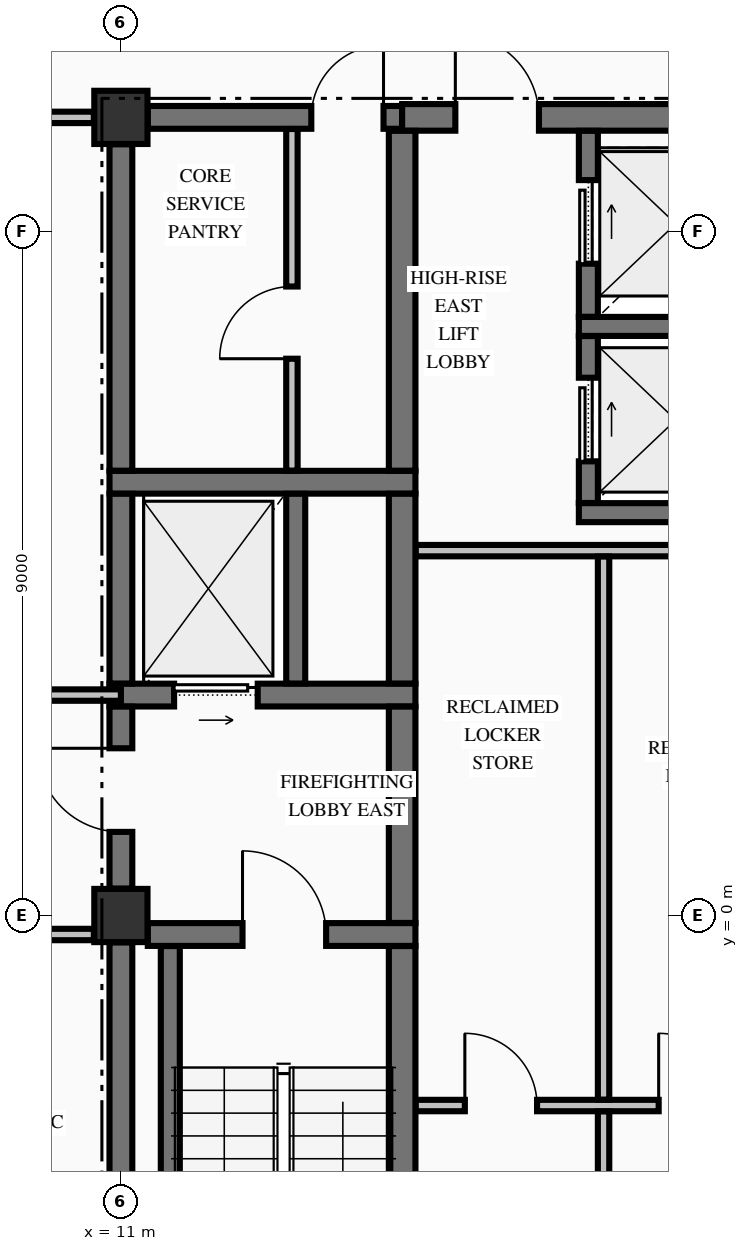
"""IFC4 building model, lengths in metres.
Left out: names, types, materials, properties, quantities, classifications, styles, units other than length and angle.
Written with IfcOpenShell. Run it as: python <this file> out.ifc"""

import sys

from ifc_helpers import new_model, si_unit, direction, frame, frame_2d, origin, origin_2d, place, context, subcontext, project, spatial, rectangle, extrude, element, fill, save


model = new_model("IFC4")
c1 = context("Model", 3, precision=1e-05, world=origin(), true_north=direction((0.0, 1.0)))
c2 = subcontext(c1, "Body", "Model", "MODEL_VIEW")
j1 = project(units=[si_unit("LENGTHUNIT", "METRE"), si_unit("PLANEANGLEUNIT", "RADIAN")], contexts=[c1])
p1 = place(None, origin())
s1 = spatial("IfcSite", under=j1, at=p1, CompositionType="ELEMENT")
p2 = place(p1, origin())
s2 = spatial("IfcBuilding", under=s1, at=p2, CompositionType="ELEMENT")
p3 = place(p2, frame((0.0, 0.0, 270.58)))
s3 = spatial("IfcBuildingStorey", under=s2, at=p3, CompositionType="ELEMENT", Elevation=270.58)
for number, where, z_axis, x_axis in (
    (1, (11.0, 0.0, -0.325), (0.0, 0.0, 1.0), (1.0, 0.0, 0.0)),
    (2, (11.0, 10.5, -0.325), (0.0, 0.0, 1.0), (1.0, 0.0, 0.0)),
):
    element("IfcColumn", number, at=place(p3, frame(where, z_axis=z_axis, x_axis=x_axis)), inside=s3, PredefinedType="COLUMN", context=c2, shape_type="SweptSolid", body=[
        extrude(rectangle(XDim=0.7, YDim=0.7, at=origin_2d()), origin(), (0.0, 0.0, 1.0), 3.815),
    ])
p4 = place(p3, frame((11.354, -0.25, 0.0), z_axis=(0.0, 0.0, 1.0), x_axis=(1.0, 0.0, 0.0)))
e3 = element("IfcWall", 3, at=p4, inside=s3, PredefinedType="SHEAR", context=c2, shape_type="SweptSolid", body=[
    extrude(rectangle(XDim=3.521, YDim=0.3, at=frame_2d((1.76, 0.0))), origin(), (0.0, 0.0, 1.0), 3.49),
])
p5 = place(p4, frame((1.246, 0.0, 0.0)))
e4 = element("IfcOpeningElement", 4, at=p5, cuts=e3, PredefinedType="OPENING", context=c2, shape_type="SweptSolid", body=[
    extrude(rectangle(XDim=1.1, YDim=2.15, at=frame_2d((0.55, 1.075))), frame((0.0, 0.16, 0.0), z_axis=(0.0, -1.0, 0.0), x_axis=(1.0, 0.0, 0.0)), (0.0, 0.0, 1.0), 0.32),
])
p6 = place(p3, frame((10.85, 2.9, 0.0), z_axis=(0.0, 0.0, 1.0), x_axis=(1.0, 0.0, 0.0)))
e5 = element("IfcWall", 5, at=p6, inside=s3, PredefinedType="SHEAR", context=c2, shape_type="SweptSolid", body=[
    extrude(rectangle(XDim=4.025, YDim=0.3, at=frame_2d((2.012, 0.0))), origin(), (0.0, 0.0, 1.0), 3.49),
])
p7 = place(p6, frame((0.85, 0.0, 0.0)))
e6 = element("IfcOpeningElement", 6, at=p7, cuts=e5, PredefinedType="OPENING", context=c2, shape_type="SweptSolid", body=[
    extrude(rectangle(XDim=1.1, YDim=2.2, at=frame_2d((0.55, 1.1))), frame((0.0, 0.16, 0.0), z_axis=(0.0, -1.0, 0.0), x_axis=(1.0, 0.0, 0.0)), (0.0, 0.0, 1.0), 0.32),
])
p8 = place(p3, frame((17.025, 5.3, 0.0), z_axis=(0.0, 0.0, 1.0), x_axis=(1.0, 0.0, 0.0)))
e7 = element("IfcWall", 7, at=p8, inside=s3, PredefinedType="SOLIDWALL", context=c2, shape_type="SweptSolid", body=[
    extrude(rectangle(XDim=3.15, YDim=0.25, at=frame_2d((1.575, 0.0))), origin(), (0.0, 0.0, 1.0), 3.49),
])
p9 = place(p3, frame((10.85, 5.7, 0.0), z_axis=(0.0, 0.0, 1.0), x_axis=(1.0, 0.0, 0.0)))
e8 = element("IfcWall", 8, at=p9, inside=s3, PredefinedType="SHEAR", context=c2, shape_type="SweptSolid", body=[
    extrude(rectangle(XDim=4.025, YDim=0.3, at=frame_2d((2.012, 0.0))), origin(), (0.0, 0.0, 1.0), 3.49),
])
p10 = place(p3, frame((17.025, 7.75, 0.0), z_axis=(0.0, 0.0, 1.0), x_axis=(1.0, 0.0, 0.0)))
e9 = element("IfcWall", 9, at=p10, inside=s3, PredefinedType="SOLIDWALL", context=c2, shape_type="SweptSolid", body=[
    extrude(rectangle(XDim=3.15, YDim=0.25, at=frame_2d((1.575, 0.0))), origin(), (0.0, 0.0, 1.0), 3.49),
])
p11 = place(p3, frame((11.354, 10.5, 0.0), z_axis=(0.0, 0.0, 1.0), x_axis=(1.0, 0.0, 0.0)))
e10 = element("IfcWall", 10, at=p11, inside=s3, PredefinedType="SHEAR", context=c2, shape_type="SweptSolid", body=[
    extrude(rectangle(XDim=3.346, YDim=0.3, at=frame_2d((1.673, 0.0))), origin(), (0.0, 0.0, 1.0), 3.49),
])
p12 = place(p11, frame((2.151, 0.0, 0.0)))
e11 = element("IfcOpeningElement", 11, at=p12, cuts=e10, PredefinedType="OPENING", context=c2, shape_type="SweptSolid", body=[
    extrude(rectangle(XDim=0.95, YDim=2.15, at=frame_2d((0.475, 1.075))), frame((0.0, 0.16, 0.0), z_axis=(0.0, -1.0, 0.0), x_axis=(1.0, 0.0, 0.0)), (0.0, 0.0, 1.0), 0.32),
])
p13 = place(p3, frame((14.7, 10.5, 0.0), z_axis=(0.0, 0.0, 1.0), x_axis=(1.0, 0.0, 0.0)))
e12 = element("IfcWall", 12, at=p13, inside=s3, PredefinedType="SHEAR", context=c2, shape_type="SweptSolid", body=[
    extrude(rectangle(XDim=4.946, YDim=0.35, at=frame_2d((2.473, 0.0))), origin(), (0.0, 0.0, 1.0), 3.49),
])
p14 = place(p13, frame((0.7, 0.0, 0.0)))
e13 = element("IfcOpeningElement", 13, at=p14, cuts=e12, PredefinedType="OPENING", context=c2, shape_type="SweptSolid", body=[
    extrude(rectangle(XDim=1.1, YDim=2.15, at=frame_2d((0.55, 1.075))), frame((0.0, 0.185, 0.0), z_axis=(0.0, -1.0, 0.0), x_axis=(1.0, 0.0, 0.0)), (0.0, 0.0, 1.0), 0.37),
])
p15 = place(p3, frame((14.878, -2.5, 0.0), z_axis=(0.0, 0.0, 1.0), x_axis=(1.0, 0.0, 0.0)))
e14 = element("IfcWall", 14, at=p15, inside=s3, PredefinedType="PARTITIONING", context=c2, shape_type="SweptSolid", body=[
    extrude(rectangle(XDim=4.944, YDim=0.15, at=frame_2d((2.472, 0.0))), origin(), (0.0, 0.0, 1.0), 3.49),
])
p16 = place(p15, frame((0.647, 0.0, 0.0)))
e15 = element("IfcOpeningElement", 15, at=p16, cuts=e14, PredefinedType="OPENING", context=c2, shape_type="SweptSolid", body=[
    extrude(rectangle(XDim=0.95, YDim=2.15, at=frame_2d((0.475, 1.075))), frame((0.0, 0.085, 0.0), z_axis=(0.0, -1.0, 0.0), x_axis=(1.0, 0.0, 0.0)), (0.0, 0.0, 1.0), 0.17),
])
p17 = place(p15, frame((3.197, 0.0, 0.0)))
e16 = element("IfcOpeningElement", 16, at=p17, cuts=e14, PredefinedType="OPENING", context=c2, shape_type="SweptSolid", body=[
    extrude(rectangle(XDim=0.95, YDim=2.15, at=frame_2d((0.475, 1.075))), frame((0.0, 0.085, 0.0), z_axis=(0.0, -1.0, 0.0), x_axis=(1.0, 0.0, 0.0)), (0.0, 0.0, 1.0), 0.17),
])
p18 = place(p3, frame((-10.644, -0.25, 0.0), z_axis=(0.0, 0.0, 1.0), x_axis=(1.0, 0.0, 0.0)))
e17 = element("IfcWall", 17, at=p18, inside=s3, PredefinedType="PARTITIONING", context=c2, shape_type="SweptSolid", body=[
    extrude(rectangle(XDim=21.288, YDim=0.15, at=frame_2d((10.644, 0.0))), origin(), (0.0, 0.0, 1.0), 3.49),
])
p19 = place(p18, frame((6.394, 0.0, 0.0)))
e18 = element("IfcOpeningElement", 18, at=p19, cuts=e17, PredefinedType="OPENING", context=c2, shape_type="SweptSolid", body=[
    extrude(rectangle(XDim=1.1, YDim=2.15, at=frame_2d((0.55, 1.075))), frame((0.0, 0.085, 0.0), z_axis=(0.0, -1.0, 0.0), x_axis=(1.0, 0.0, 0.0)), (0.0, 0.0, 1.0), 0.17),
])
p20 = place(p18, frame((2.219, 0.0, 0.0)))
e19 = element("IfcOpeningElement", 19, at=p20, cuts=e17, PredefinedType="OPENING", context=c2, shape_type="SweptSolid", body=[
    extrude(rectangle(XDim=1.05, YDim=2.15, at=frame_2d((0.525, 1.075))), frame((0.0, 0.085, 0.0), z_axis=(0.0, -1.0, 0.0), x_axis=(1.0, 0.0, 0.0)), (0.0, 0.0, 1.0), 0.17),
])
p21 = place(p18, frame((14.369, 0.0, 0.0)))
e20 = element("IfcOpeningElement", 20, at=p21, cuts=e17, PredefinedType="OPENING", context=c2, shape_type="SweptSolid", body=[
    extrude(rectangle(XDim=0.95, YDim=2.15, at=frame_2d((0.475, 1.075))), frame((0.0, 0.085, 0.0), z_axis=(0.0, -1.0, 0.0), x_axis=(1.0, 0.0, 0.0)), (0.0, 0.0, 1.0), 0.17),
])
p22 = place(p3, frame((-11.0, 2.9, 0.0), z_axis=(0.0, 0.0, 1.0), x_axis=(1.0, 0.0, 0.0)))
e21 = element("IfcWall", 21, at=p22, inside=s3, PredefinedType="PARTITIONING", context=c2, shape_type="SweptSolid", body=[
    extrude(rectangle(XDim=22.0, YDim=0.15, at=frame_2d((11.0, 0.0))), origin(), (0.0, 0.0, 1.0), 3.49),
])
p23 = place(p22, frame((6.75, 0.0, 0.0)))
e22 = element("IfcOpeningElement", 22, at=p23, cuts=e21, PredefinedType="OPENING", context=c2, shape_type="SweptSolid", body=[
    extrude(rectangle(XDim=1.1, YDim=2.15, at=frame_2d((0.55, 1.075))), frame((0.0, 0.085, 0.0), z_axis=(0.0, -1.0, 0.0), x_axis=(1.0, 0.0, 0.0)), (0.0, 0.0, 1.0), 0.17),
])
p24 = place(p22, frame((2.575, 0.0, 0.0)))
e23 = element("IfcOpeningElement", 23, at=p24, cuts=e21, PredefinedType="OPENING", context=c2, shape_type="SweptSolid", body=[
    extrude(rectangle(XDim=1.05, YDim=2.15, at=frame_2d((0.525, 1.075))), frame((0.0, 0.085, 0.0), z_axis=(0.0, -1.0, 0.0), x_axis=(1.0, 0.0, 0.0)), (0.0, 0.0, 1.0), 0.17),
])
p25 = place(p22, frame((14.65, 0.0, 0.0)))
e24 = element("IfcOpeningElement", 24, at=p25, cuts=e21, PredefinedType="OPENING", context=c2, shape_type="SweptSolid", body=[
    extrude(rectangle(XDim=1.1, YDim=2.15, at=frame_2d((0.55, 1.075))), frame((0.0, 0.085, 0.0), z_axis=(0.0, -1.0, 0.0), x_axis=(1.0, 0.0, 0.0)), (0.0, 0.0, 1.0), 0.17),
])
p26 = place(p3, frame((14.878, 4.8, 0.0), z_axis=(0.0, 0.0, 1.0), x_axis=(1.0, 0.0, 0.0)))
e25 = element("IfcWall", 25, at=p26, inside=s3, PredefinedType="PARTITIONING", context=c2, shape_type="SweptSolid", body=[
    extrude(rectangle(XDim=4.944, YDim=0.15, at=frame_2d((2.472, 0.0))), origin(), (0.0, 0.0, 1.0), 3.49),
])
p27 = place(p3, frame((-10.644, 10.5, 0.0), z_axis=(0.0, 0.0, 1.0), x_axis=(1.0, 0.0, 0.0)))
e26 = element("IfcWall", 26, at=p27, inside=s3, PredefinedType="PARTITIONING", context=c2, shape_type="SweptSolid", body=[
    extrude(rectangle(XDim=21.288, YDim=0.15, at=frame_2d((10.644, 0.0))), origin(), (0.0, 0.0, 1.0), 3.49),
])
p28 = place(p27, frame((6.394, 0.0, 0.0)))
e27 = element("IfcOpeningElement", 27, at=p28, cuts=e26, PredefinedType="OPENING", context=c2, shape_type="SweptSolid", body=[
    extrude(rectangle(XDim=1.1, YDim=2.15, at=frame_2d((0.55, 1.075))), frame((0.0, 0.085, 0.0), z_axis=(0.0, -1.0, 0.0), x_axis=(1.0, 0.0, 0.0)), (0.0, 0.0, 1.0), 0.17),
])
p29 = place(p3, frame((11.0, -9.596, 0.0), z_axis=(0.0, 0.0, 1.0), x_axis=(0.0, 1.0, 0.0)))
e28 = element("IfcWall", 28, at=p29, inside=s3, PredefinedType="SHEAR", context=c2, shape_type="SweptSolid", body=[
    extrude(rectangle(XDim=9.242, YDim=0.3, at=frame_2d((4.621, 0.0))), origin(), (0.0, 0.0, 1.0), 3.49),
])
p30 = place(p3, frame((11.0, 0.354, 0.0), z_axis=(0.0, 0.0, 1.0), x_axis=(0.0, 1.0, 0.0)))
e29 = element("IfcWall", 29, at=p30, inside=s3, PredefinedType="SHEAR", context=c2, shape_type="SweptSolid", body=[
    extrude(rectangle(XDim=2.394, YDim=0.3, at=frame_2d((1.197, 0.0))), origin(), (0.0, 0.0, 1.0), 3.49),
])
p31 = place(p30, frame((0.746, 0.0, 0.0)))
e30 = element("IfcOpeningElement", 30, at=p31, cuts=e29, PredefinedType="OPENING", context=c2, shape_type="SweptSolid", body=[
    extrude(rectangle(XDim=1.1, YDim=2.15, at=frame_2d((0.55, 1.075))), frame((0.0, 0.16, 0.0), z_axis=(0.0, -1.0, 0.0), x_axis=(1.0, 0.0, 0.0)), (0.0, 0.0, 1.0), 0.32),
])
p32 = place(p3, frame((11.0, 3.052, 0.0), z_axis=(0.0, 0.0, 1.0), x_axis=(0.0, 1.0, 0.0)))
e31 = element("IfcWall", 31, at=p32, inside=s3, PredefinedType="SHEAR", context=c2, shape_type="SweptSolid", body=[
    extrude(rectangle(XDim=2.496, YDim=0.3, at=frame_2d((1.248, 0.0))), origin(), (0.0, 0.0, 1.0), 3.49),
])
p33 = place(p3, frame((11.0, 5.852, 0.0), z_axis=(0.0, 0.0, 1.0), x_axis=(0.0, 1.0, 0.0)))
e32 = element("IfcWall", 32, at=p33, inside=s3, PredefinedType="SHEAR", context=c2, shape_type="SweptSolid", body=[
    extrude(rectangle(XDim=4.294, YDim=0.3, at=frame_2d((2.147, 0.0))), origin(), (0.0, 0.0, 1.0), 3.49),
])
p34 = place(p3, frame((11.65, -9.798, 0.0), z_axis=(0.0, 0.0, 1.0), x_axis=(0.0, 1.0, 0.0)))
e33 = element("IfcWall", 33, at=p34, inside=s3, PredefinedType="SOLIDWALL", context=c2, shape_type="SweptSolid", body=[
    extrude(rectangle(XDim=9.396, YDim=0.25, at=frame_2d((4.698, 0.0))), origin(), (0.0, 0.0, 1.0), 3.49),
])
p35 = place(p3, frame((13.3, 3.052, 0.0), z_axis=(0.0, 0.0, 1.0), x_axis=(0.0, 1.0, 0.0)))
e34 = element("IfcWall", 34, at=p35, inside=s3, PredefinedType="SOLIDWALL", context=c2, shape_type="SweptSolid", body=[
    extrude(rectangle(XDim=2.496, YDim=0.25, at=frame_2d((1.248, 0.0))), origin(), (0.0, 0.0, 1.0), 3.49),
])
p36 = place(p3, frame((14.7, -9.773, 0.0), z_axis=(0.0, 0.0, 1.0), x_axis=(0.0, 1.0, 0.0)))
e35 = element("IfcWall", 35, at=p36, inside=s3, PredefinedType="SHEAR", context=c2, shape_type="SweptSolid", body=[
    extrude(rectangle(XDim=9.371, YDim=0.35, at=frame_2d((4.686, 0.0))), origin(), (0.0, 0.0, 1.0), 3.49),
])
p37 = place(p3, frame((14.7, -0.098, 0.0), z_axis=(0.0, 0.0, 1.0), x_axis=(0.0, 1.0, 0.0)))
e36 = element("IfcWall", 36, at=p37, inside=s3, PredefinedType="SHEAR", context=c2, shape_type="SweptSolid", body=[
    extrude(rectangle(XDim=2.846, YDim=0.35, at=frame_2d((1.423, 0.0))), origin(), (0.0, 0.0, 1.0), 3.49),
])
p38 = place(p3, frame((14.7, 3.052, 0.0), z_axis=(0.0, 0.0, 1.0), x_axis=(0.0, 1.0, 0.0)))
e37 = element("IfcWall", 37, at=p38, inside=s3, PredefinedType="SHEAR", context=c2, shape_type="SweptSolid", body=[
    extrude(rectangle(XDim=2.496, YDim=0.35, at=frame_2d((1.248, 0.0))), origin(), (0.0, 0.0, 1.0), 3.49),
])
p39 = place(p3, frame((14.7, 5.852, 0.0), z_axis=(0.0, 0.0, 1.0), x_axis=(0.0, 1.0, 0.0)))
e38 = element("IfcWall", 38, at=p39, inside=s3, PredefinedType="SHEAR", context=c2, shape_type="SweptSolid", body=[
    extrude(rectangle(XDim=4.471, YDim=0.35, at=frame_2d((2.235, 0.0))), origin(), (0.0, 0.0, 1.0), 3.49),
])
p40 = place(p3, frame((17.15, 5.427, 0.0), z_axis=(0.0, 0.0, 1.0), x_axis=(0.0, 1.0, 0.0)))
e39 = element("IfcWall", 39, at=p40, inside=s3, PredefinedType="SOLIDWALL", context=c2, shape_type="SweptSolid", body=[
    extrude(rectangle(XDim=2.196, YDim=0.25, at=frame_2d((1.098, 0.0))), origin(), (0.0, 0.0, 1.0), 3.49),
])
p41 = place(p40, frame((0.548, 0.0, 0.0)))
e40 = element("IfcOpeningElement", 40, at=p41, cuts=e39, PredefinedType="OPENING", context=c2, shape_type="SweptSolid", body=[
    extrude(rectangle(XDim=1.1, YDim=2.2, at=frame_2d((0.55, 1.1))), frame((0.0, 0.135, 0.0), z_axis=(0.0, -1.0, 0.0), x_axis=(1.0, 0.0, 0.0)), (0.0, 0.0, 1.0), 0.27),
])
p42 = place(p3, frame((17.15, 7.877, 0.0), z_axis=(0.0, 0.0, 1.0), x_axis=(0.0, 1.0, 0.0)))
e41 = element("IfcWall", 41, at=p42, inside=s3, PredefinedType="SOLIDWALL", context=c2, shape_type="SweptSolid", body=[
    extrude(rectangle(XDim=2.446, YDim=0.25, at=frame_2d((1.223, 0.0))), origin(), (0.0, 0.0, 1.0), 3.49),
])
p43 = place(p42, frame((0.698, 0.0, 0.0)))
e42 = element("IfcOpeningElement", 42, at=p43, cuts=e41, PredefinedType="OPENING", context=c2, shape_type="SweptSolid", body=[
    extrude(rectangle(XDim=1.1, YDim=2.2, at=frame_2d((0.55, 1.1))), frame((0.0, 0.135, 0.0), z_axis=(0.0, -1.0, 0.0), x_axis=(1.0, 0.0, 0.0)), (0.0, 0.0, 1.0), 0.27),
])
p44 = place(p3, frame((13.25, 5.853, 0.0), z_axis=(0.0, 0.0, 1.0), x_axis=(0.0, 1.0, 0.0)))
e43 = element("IfcWall", 43, at=p44, inside=s3, PredefinedType="PARTITIONING", context=c2, shape_type="SweptSolid", body=[
    extrude(rectangle(XDim=4.494, YDim=0.15, at=frame_2d((2.247, 0.0))), origin(), (0.0, 0.0, 1.0), 3.49),
])
p45 = place(p44, frame((1.472, 0.0, 0.0)))
e44 = element("IfcOpeningElement", 44, at=p45, cuts=e43, PredefinedType="OPENING", context=c2, shape_type="SweptSolid", body=[
    extrude(rectangle(XDim=0.95, YDim=2.15, at=frame_2d((0.475, 1.075))), frame((0.0, 0.085, 0.0), z_axis=(0.0, -1.0, 0.0), x_axis=(1.0, 0.0, 0.0)), (0.0, 0.0, 1.0), 0.17),
])
p46 = place(p3, frame((17.35, -9.772, 0.0), z_axis=(0.0, 0.0, 1.0), x_axis=(0.0, 1.0, 0.0)))
e45 = element("IfcWall", 45, at=p46, inside=s3, PredefinedType="PARTITIONING", context=c2, shape_type="SweptSolid", body=[
    extrude(rectangle(XDim=7.194, YDim=0.15, at=frame_2d((3.597, 0.0))), origin(), (0.0, 0.0, 1.0), 3.49),
])
p47 = place(p3, frame((17.35, -2.422, 0.0), z_axis=(0.0, 0.0, 1.0), x_axis=(0.0, 1.0, 0.0)))
e46 = element("IfcWall", 46, at=p47, inside=s3, PredefinedType="PARTITIONING", context=c2, shape_type="SweptSolid", body=[
    extrude(rectangle(XDim=7.144, YDim=0.15, at=frame_2d((3.572, 0.0))), origin(), (0.0, 0.0, 1.0), 3.49),
])
p48 = place(p5, origin())
e47 = element("IfcDoor", 47, at=p48, inside=s3, OperationType="SINGLE_SWING_LEFT", PredefinedType="DOOR", context=c2, shape_type="SweptSolid", body=[
    extrude(rectangle(XDim=1.1, YDim=2.15, at=frame_2d((0.55, 1.075))), frame((0.0, 0.025, 0.0), z_axis=(0.0, -1.0, 0.0), x_axis=(1.0, 0.0, 0.0)), (0.0, 0.0, 1.0), 0.05),
])
fill(e4, e47)
p49 = place(p31, origin())
e48 = element("IfcDoor", 48, at=p49, inside=s3, OperationType="SINGLE_SWING_RIGHT", PredefinedType="DOOR", context=c2, shape_type="SweptSolid", body=[
    extrude(rectangle(XDim=1.1, YDim=2.15, at=frame_2d((0.55, 1.075))), frame((0.0, 0.025, 0.0), z_axis=(0.0, -1.0, 0.0), x_axis=(1.0, 0.0, 0.0)), (0.0, 0.0, 1.0), 0.05),
])
fill(e30, e48)
p50 = place(p7, origin())
e49 = element("IfcDoor", 49, at=p50, inside=s3, OperationType="SLIDING_TO_RIGHT", PredefinedType="DOOR", context=c2, shape_type="SweptSolid", body=[
    extrude(rectangle(XDim=1.1, YDim=2.2, at=frame_2d((0.55, 1.1))), frame((0.0, 0.025, 0.0), z_axis=(0.0, -1.0, 0.0), x_axis=(1.0, 0.0, 0.0)), (0.0, 0.0, 1.0), 0.05),
])
fill(e6, e49)
p51 = place(p12, origin())
e50 = element("IfcDoor", 50, at=p51, inside=s3, OperationType="SINGLE_SWING_RIGHT", PredefinedType="DOOR", context=c2, shape_type="SweptSolid", body=[
    extrude(rectangle(XDim=0.95, YDim=2.15, at=frame_2d((0.475, 1.075))), frame((0.0, 0.025, 0.0), z_axis=(0.0, -1.0, 0.0), x_axis=(1.0, 0.0, 0.0)), (0.0, 0.0, 1.0), 0.05),
])
fill(e11, e50)
p52 = place(p45, origin())
e51 = element("IfcDoor", 51, at=p52, inside=s3, OperationType="SINGLE_SWING_LEFT", PredefinedType="DOOR", context=c2, shape_type="SweptSolid", body=[
    extrude(rectangle(XDim=0.95, YDim=2.15, at=frame_2d((0.475, 1.075))), frame((0.0, 0.025, 0.0), z_axis=(0.0, -1.0, 0.0), x_axis=(1.0, 0.0, 0.0)), (0.0, 0.0, 1.0), 0.05),
])
fill(e44, e51)
p53 = place(p41, origin())
e52 = element("IfcDoor", 52, at=p53, inside=s3, OperationType="SLIDING_TO_RIGHT", PredefinedType="DOOR", context=c2, shape_type="SweptSolid", body=[
    extrude(rectangle(XDim=1.1, YDim=2.2, at=frame_2d((0.55, 1.1))), frame((0.0, 0.025, 0.0), z_axis=(0.0, -1.0, 0.0), x_axis=(1.0, 0.0, 0.0)), (0.0, 0.0, 1.0), 0.05),
])
fill(e40, e52)
p54 = place(p43, origin())
e53 = element("IfcDoor", 53, at=p54, inside=s3, OperationType="SLIDING_TO_RIGHT", PredefinedType="DOOR", context=c2, shape_type="SweptSolid", body=[
    extrude(rectangle(XDim=1.1, YDim=2.2, at=frame_2d((0.55, 1.1))), frame((0.0, 0.025, 0.0), z_axis=(0.0, -1.0, 0.0), x_axis=(1.0, 0.0, 0.0)), (0.0, 0.0, 1.0), 0.05),
])
fill(e42, e53)
p55 = place(p14, origin())
e54 = element("IfcDoor", 54, at=p55, inside=s3, OperationType="SINGLE_SWING_LEFT", PredefinedType="DOOR", context=c2, shape_type="SweptSolid", body=[
    extrude(rectangle(XDim=1.1, YDim=2.15, at=frame_2d((0.55, 1.075))), frame((0.0, 0.025, 0.0), z_axis=(0.0, -1.0, 0.0), x_axis=(1.0, 0.0, 0.0)), (0.0, 0.0, 1.0), 0.05),
])
fill(e13, e54)
p56 = place(p16, origin())
e55 = element("IfcDoor", 55, at=p56, inside=s3, OperationType="SINGLE_SWING_LEFT", PredefinedType="DOOR", context=c2, shape_type="SweptSolid", body=[
    extrude(rectangle(XDim=0.95, YDim=2.15, at=frame_2d((0.475, 1.075))), frame((0.0, 0.025, 0.0), z_axis=(0.0, -1.0, 0.0), x_axis=(1.0, 0.0, 0.0)), (0.0, 0.0, 1.0), 0.05),
])
fill(e15, e55)
p57 = place(p17, origin())
e56 = element("IfcDoor", 56, at=p57, inside=s3, OperationType="SINGLE_SWING_LEFT", PredefinedType="DOOR", context=c2, shape_type="SweptSolid", body=[
    extrude(rectangle(XDim=0.95, YDim=2.15, at=frame_2d((0.475, 1.075))), frame((0.0, 0.025, 0.0), z_axis=(0.0, -1.0, 0.0), x_axis=(1.0, 0.0, 0.0)), (0.0, 0.0, 1.0), 0.05),
])
fill(e16, e56)
save(model, sys.argv[1])
